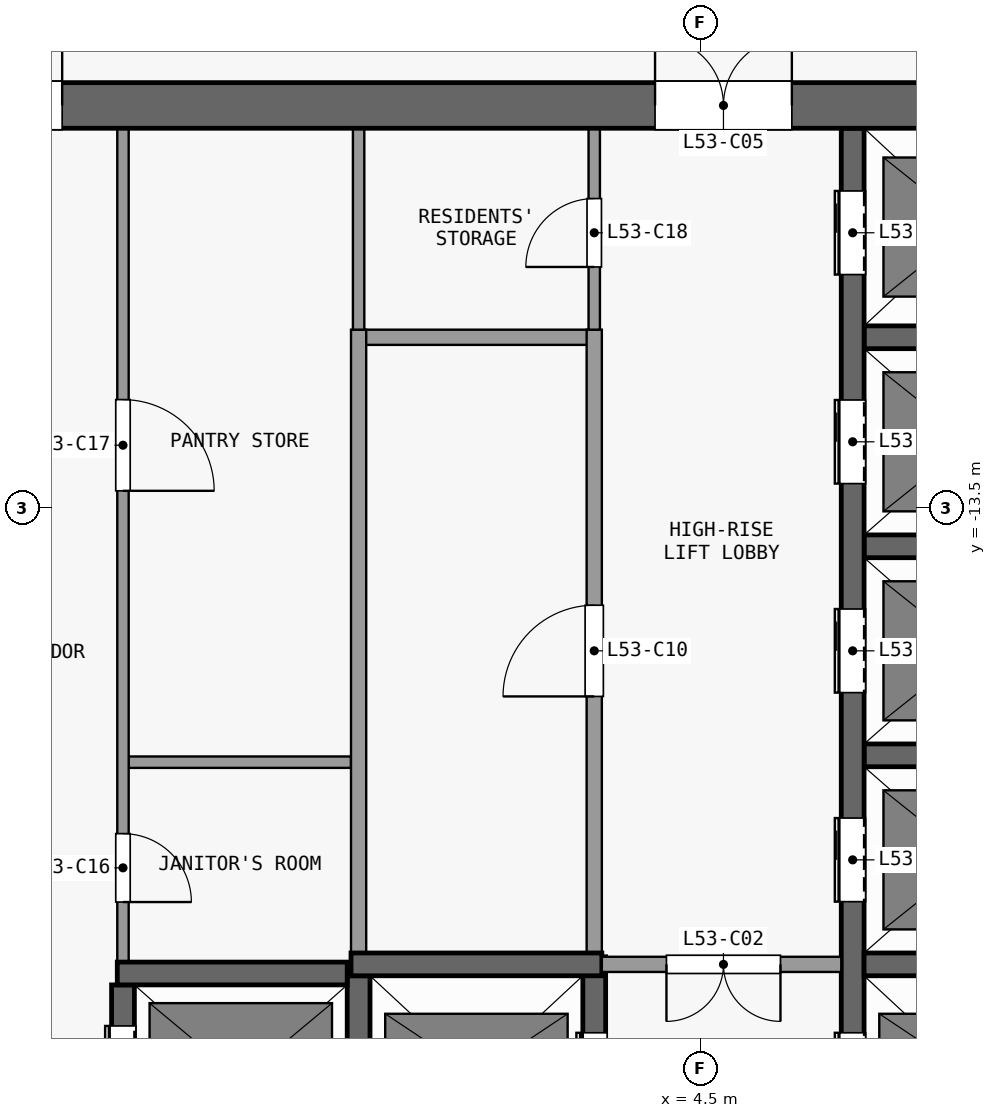
"""IFC4 building model, lengths in metres.
Left out: names, types, materials, properties, quantities, classifications, styles, units other than length and angle.
Written with IfcOpenShell. Run it as: python <this file> out.ifc"""

import sys

from ifc_helpers import new_model, si_unit, direction, frame, frame_2d, origin, place, context, subcontext, project, spatial, rectangle, extrude, element, fill, save


model = new_model("IFC4")
c1 = context("Model", 3, precision=1e-05, world=origin(), true_north=direction((0.0, 1.0)))
c2 = subcontext(c1, "Body", "Model", "MODEL_VIEW")
j1 = project(units=[si_unit("LENGTHUNIT", "METRE"), si_unit("PLANEANGLEUNIT", "RADIAN")], contexts=[c1])
p1 = place(None, origin())
s1 = spatial("IfcSite", under=j1, at=p1, CompositionType="ELEMENT")
p2 = place(p1, origin())
s2 = spatial("IfcBuilding", under=s1, at=p2, CompositionType="ELEMENT")
p3 = place(p2, frame((0.0, 0.0, 212.3)))
s3 = spatial("IfcBuildingStorey", under=s2, at=p3, CompositionType="ELEMENT", Elevation=212.3)
p4 = place(p3, frame((-13.2, -8.2, 0.0), z_axis=(0.0, 0.0, 1.0), x_axis=(1.0, 0.0, 0.0)))
e1 = element("IfcWall", 1, at=p4, inside=s3, PredefinedType="SHEAR", context=c2, shape_type="SweptSolid", body=[
    extrude(rectangle(XDim=26.4, YDim=0.6, at=frame_2d((13.2, 0.0))), origin(), (0.0, 0.0, 1.0), 3.3),
])
p5 = place(p4, frame((7.5, 0.0, 0.0)))
e2 = element("IfcOpeningElement", 2, at=p5, cuts=e1, PredefinedType="OPENING", context=c2, shape_type="SweptSolid", body=[
    extrude(rectangle(XDim=1.8, YDim=2.1, at=frame_2d((0.9, 1.05))), frame((0.0, 0.31, 0.0), z_axis=(0.0, -1.0, 0.0), x_axis=(1.0, 0.0, 0.0)), (0.0, 0.0, 1.0), 0.62),
])
p6 = place(p4, frame((17.1, 0.0, 0.0)))
e3 = element("IfcOpeningElement", 3, at=p6, cuts=e1, PredefinedType="OPENING", context=c2, shape_type="SweptSolid", body=[
    extrude(rectangle(XDim=1.8, YDim=2.1, at=frame_2d((0.9, 1.05))), frame((0.0, 0.31, 0.0), z_axis=(0.0, -1.0, 0.0), x_axis=(1.0, 0.0, 0.0)), (0.0, 0.0, 1.0), 0.62),
])
p7 = place(p4, frame((2.425, 0.0, 0.0)))
e4 = element("IfcOpeningElement", 4, at=p7, cuts=e1, PredefinedType="OPENING", context=c2, shape_type="SweptSolid", body=[
    extrude(rectangle(XDim=0.9, YDim=2.1, at=frame_2d((0.45, 1.05))), frame((0.0, 0.31, 0.0), z_axis=(0.0, -1.0, 0.0), x_axis=(1.0, 0.0, 0.0)), (0.0, 0.0, 1.0), 0.62),
])
p8 = place(p4, frame((23.075, 0.0, 0.0)))
e5 = element("IfcOpeningElement", 5, at=p8, cuts=e1, PredefinedType="OPENING", context=c2, shape_type="SweptSolid", body=[
    extrude(rectangle(XDim=0.9, YDim=2.1, at=frame_2d((0.45, 1.05))), frame((0.0, 0.31, 0.0), z_axis=(0.0, -1.0, 0.0), x_axis=(1.0, 0.0, 0.0)), (0.0, 0.0, 1.0), 0.62),
])
p9 = place(p3, frame((-3.175, -19.62, 0.0), z_axis=(0.0, 0.0, 1.0), x_axis=(1.0, 0.0, 0.0)))
e6 = element("IfcWall", 6, at=p9, inside=s3, PredefinedType="SHEAR", context=c2, shape_type="SweptSolid", body=[
    extrude(rectangle(XDim=3.025, YDim=0.3, at=frame_2d((1.513, 0.0))), origin(), (0.0, 0.0, 1.0), 3.3),
])
p10 = place(p3, frame((-0.1, -19.5, 0.0), z_axis=(0.0, 0.0, 1.0), x_axis=(1.0, 0.0, 0.0)))
e7 = element("IfcWall", 7, at=p10, inside=s3, PredefinedType="SHEAR", context=c2, shape_type="SweptSolid", body=[
    extrude(rectangle(XDim=3.3, YDim=0.3, at=frame_2d((1.65, 0.0))), origin(), (0.0, 0.0, 1.0), 3.3),
])
p11 = place(p3, frame((6.35, -19.5, 0.0), z_axis=(0.0, 0.0, 1.0), x_axis=(-1.0, 0.0, 0.0)))
e8 = element("IfcWall", 8, at=p11, inside=s3, PredefinedType="PARTITIONING", context=c2, shape_type="SweptSolid", body=[
    extrude(rectangle(XDim=3.15, YDim=0.2, at=frame_2d((1.575, 0.0))), origin(), (0.0, 0.0, 1.0), 3.3),
])
p12 = place(p11, frame((0.8, 0.0, 0.0)))
e9 = element("IfcOpeningElement", 9, at=p12, cuts=e8, PredefinedType="OPENING", context=c2, shape_type="SweptSolid", body=[
    extrude(rectangle(XDim=1.5, YDim=2.1, at=frame_2d((0.75, 1.05))), frame((0.0, 0.11, 0.0), z_axis=(0.0, -1.0, 0.0), x_axis=(1.0, 0.0, 0.0)), (0.0, 0.0, 1.0), 0.22),
])
p13 = place(p3, frame((6.65, -19.5, 0.0), z_axis=(0.0, 0.0, 1.0), x_axis=(1.0, 0.0, 0.0)))
e10 = element("IfcWall", 10, at=p13, inside=s3, PredefinedType="SHEAR", context=c2, shape_type="SweptSolid", body=[
    extrude(rectangle(XDim=2.8, YDim=0.3, at=frame_2d((1.4, 0.0))), origin(), (0.0, 0.0, 1.0), 3.3),
])
p14 = place(p3, frame((-3.025, -16.84, 0.0), z_axis=(0.0, 0.0, 1.0), x_axis=(1.0, 0.0, 0.0)))
e11 = element("IfcWall", 11, at=p14, inside=s3, PredefinedType="PARTITIONING", context=c2, shape_type="SweptSolid", body=[
    extrude(rectangle(XDim=2.925, YDim=0.15, at=frame_2d((1.462, 0.0))), origin(), (0.0, 0.0, 1.0), 3.3),
])
for number, where, z_axis, x_axis in (
    (12, (6.65, -16.75, 0.0), (0.0, 0.0, 1.0), (1.0, 0.0, 0.0)),
    (13, (6.65, -14.0, 0.0), (0.0, 0.0, 1.0), (1.0, 0.0, 0.0)),
):
    element("IfcWall", number, at=place(p3, frame(where, z_axis=z_axis, x_axis=x_axis)), inside=s3, PredefinedType="SHEAR", context=c2, shape_type="SweptSolid", body=[
        extrude(rectangle(XDim=2.8, YDim=0.3, at=frame_2d((1.4, 0.0))), origin(), (0.0, 0.0, 1.0), 3.3),
    ])
p15 = place(p3, frame((-0.075, -11.25, 0.0), z_axis=(0.0, 0.0, 1.0), x_axis=(1.0, 0.0, 0.0)))
e14 = element("IfcWall", 14, at=p15, inside=s3, PredefinedType="PARTITIONING", context=c2, shape_type="SweptSolid", body=[
    extrude(rectangle(XDim=3.25, YDim=0.2, at=frame_2d((1.625, 0.0))), origin(), (0.0, 0.0, 1.0), 3.3),
])
p16 = place(p3, frame((6.65, -11.25, 0.0), z_axis=(0.0, 0.0, 1.0), x_axis=(1.0, 0.0, 0.0)))
e15 = element("IfcWall", 15, at=p16, inside=s3, PredefinedType="SHEAR", context=c2, shape_type="SweptSolid", body=[
    extrude(rectangle(XDim=2.8, YDim=0.3, at=frame_2d((1.4, 0.0))), origin(), (0.0, 0.0, 1.0), 3.3),
])
p17 = place(p3, frame((-3.1, -22.25, 0.0), z_axis=(0.0, 0.0, 1.0), x_axis=(0.0, 1.0, 0.0)))
e16 = element("IfcWall", 16, at=p17, inside=s3, PredefinedType="SHEAR", context=c2, shape_type="SweptSolid", body=[
    extrude(rectangle(XDim=2.48, YDim=0.3, at=frame_2d((1.24, 0.0))), origin(), (0.0, 0.0, 1.0), 3.3),
])
p18 = place(p17, frame((0.54, 0.0, 0.0)))
e17 = element("IfcOpeningElement", 17, at=p18, cuts=e16, PredefinedType="OPENING", context=c2, shape_type="SweptSolid", body=[
    extrude(rectangle(XDim=1.4, YDim=2.1, at=frame_2d((0.7, 1.05))), frame((0.0, 0.16, 0.0), z_axis=(0.0, -1.0, 0.0), x_axis=(1.0, 0.0, 0.0)), (0.0, 0.0, 1.0), 0.32),
])
p19 = place(p3, frame((-3.1, -8.5, 0.0), z_axis=(0.0, 0.0, 1.0), x_axis=(0.0, -1.0, 0.0)))
e18 = element("IfcWall", 18, at=p19, inside=s3, PredefinedType="PARTITIONING", context=c2, shape_type="SweptSolid", body=[
    extrude(rectangle(XDim=10.97, YDim=0.15, at=frame_2d((5.485, 0.0))), origin(), (0.0, 0.0, 1.0), 3.3),
])
p20 = place(p19, frame((9.28, 0.0, 0.0)))
e19 = element("IfcOpeningElement", 19, at=p20, cuts=e18, PredefinedType="OPENING", context=c2, shape_type="SweptSolid", body=[
    extrude(rectangle(XDim=0.9, YDim=2.1, at=frame_2d((0.45, 1.05))), frame((0.0, 0.085, 0.0), z_axis=(0.0, -1.0, 0.0), x_axis=(1.0, 0.0, 0.0)), (0.0, 0.0, 1.0), 0.17),
])
p21 = place(p19, frame((3.57, 0.0, 0.0)))
e20 = element("IfcOpeningElement", 20, at=p21, cuts=e18, PredefinedType="OPENING", context=c2, shape_type="SweptSolid", body=[
    extrude(rectangle(XDim=1.2, YDim=2.1, at=frame_2d((0.6, 1.05))), frame((0.0, 0.085, 0.0), z_axis=(0.0, -1.0, 0.0), x_axis=(1.0, 0.0, 0.0)), (0.0, 0.0, 1.0), 0.17),
])
p22 = place(p3, frame((0.0, -22.25, 0.0), z_axis=(0.0, 0.0, 1.0), x_axis=(0.0, 1.0, 0.0)))
e21 = element("IfcWall", 21, at=p22, inside=s3, PredefinedType="SHEAR", context=c2, shape_type="SweptSolid", body=[
    extrude(rectangle(XDim=2.6, YDim=0.3, at=frame_2d((1.3, 0.0))), origin(), (0.0, 0.0, 1.0), 3.3),
])
p23 = place(p3, frame((0.0, -19.35, 0.0), z_axis=(0.0, 0.0, 1.0), x_axis=(0.0, 1.0, 0.0)))
e22 = element("IfcWall", 22, at=p23, inside=s3, PredefinedType="PARTITIONING", context=c2, shape_type="SweptSolid", body=[
    extrude(rectangle(XDim=8.2, YDim=0.2, at=frame_2d((4.1, 0.0))), origin(), (0.0, 0.0, 1.0), 3.3),
])
p24 = place(p3, frame((0.0, -11.15, 0.0), z_axis=(0.0, 0.0, 1.0), x_axis=(0.0, 1.0, 0.0)))
e23 = element("IfcWall", 23, at=p24, inside=s3, PredefinedType="PARTITIONING", context=c2, shape_type="SweptSolid", body=[
    extrude(rectangle(XDim=2.65, YDim=0.15, at=frame_2d((1.325, 0.0))), origin(), (0.0, 0.0, 1.0), 3.3),
])
p25 = place(p3, frame((3.1, -22.25, 0.0), z_axis=(0.0, 0.0, 1.0), x_axis=(0.0, 1.0, 0.0)))
e24 = element("IfcWall", 24, at=p25, inside=s3, PredefinedType="SHEAR", context=c2, shape_type="SweptSolid", body=[
    extrude(rectangle(XDim=2.85, YDim=0.3, at=frame_2d((1.425, 0.0))), origin(), (0.0, 0.0, 1.0), 3.3),
])
p26 = place(p25, frame((0.75, 0.0, 0.0)))
e25 = element("IfcOpeningElement", 25, at=p26, cuts=e24, PredefinedType="OPENING", context=c2, shape_type="SweptSolid", body=[
    extrude(rectangle(XDim=1.1, YDim=2.1, at=frame_2d((0.55, 1.05))), frame((0.0, 0.16, 0.0), z_axis=(0.0, -1.0, 0.0), x_axis=(1.0, 0.0, 0.0)), (0.0, 0.0, 1.0), 0.32),
])
p27 = place(p3, frame((3.1, -19.6, 0.0), z_axis=(0.0, 0.0, 1.0), x_axis=(0.0, 1.0, 0.0)))
e26 = element("IfcWall", 26, at=p27, inside=s3, PredefinedType="PARTITIONING", context=c2, shape_type="SweptSolid", body=[
    extrude(rectangle(XDim=8.45, YDim=0.2, at=frame_2d((4.225, 0.0))), origin(), (0.0, 0.0, 1.0), 3.3),
])
p28 = place(p27, frame((3.625, 0.0, 0.0)))
e27 = element("IfcOpeningElement", 27, at=p28, cuts=e26, PredefinedType="OPENING", context=c2, shape_type="SweptSolid", body=[
    extrude(rectangle(XDim=1.2, YDim=2.1, at=frame_2d((0.6, 1.05))), frame((0.0, 0.11, 0.0), z_axis=(0.0, -1.0, 0.0), x_axis=(1.0, 0.0, 0.0)), (0.0, 0.0, 1.0), 0.22),
])
p29 = place(p3, frame((3.1, -11.15, 0.0), z_axis=(0.0, 0.0, 1.0), x_axis=(0.0, 1.0, 0.0)))
e28 = element("IfcWall", 28, at=p29, inside=s3, PredefinedType="PARTITIONING", context=c2, shape_type="SweptSolid", body=[
    extrude(rectangle(XDim=2.65, YDim=0.15, at=frame_2d((1.325, 0.0))), origin(), (0.0, 0.0, 1.0), 3.3),
])
p30 = place(p29, frame((0.825, 0.0, 0.0)))
e29 = element("IfcOpeningElement", 29, at=p30, cuts=e28, PredefinedType="OPENING", context=c2, shape_type="SweptSolid", body=[
    extrude(rectangle(XDim=0.9, YDim=2.1, at=frame_2d((0.45, 1.05))), frame((0.0, 0.085, 0.0), z_axis=(0.0, -1.0, 0.0), x_axis=(1.0, 0.0, 0.0)), (0.0, 0.0, 1.0), 0.17),
])
p31 = place(p3, frame((6.5, -22.55, 0.0), z_axis=(0.0, 0.0, 1.0), x_axis=(0.0, 1.0, 0.0)))
e30 = element("IfcWall", 30, at=p31, inside=s3, PredefinedType="SHEAR", context=c2, shape_type="SweptSolid", body=[
    extrude(rectangle(XDim=14.05, YDim=0.3, at=frame_2d((7.025, 0.0))), origin(), (0.0, 0.0, 1.0), 3.3),
])
p32 = place(p31, frame((1.05, 0.0, 0.0)))
e31 = element("IfcOpeningElement", 31, at=p32, cuts=e30, PredefinedType="OPENING", context=c2, shape_type="SweptSolid", body=[
    extrude(rectangle(XDim=1.1, YDim=2.1, at=frame_2d((0.55, 1.05))), frame((0.0, 0.16, 0.0), z_axis=(0.0, -1.0, 0.0), x_axis=(1.0, 0.0, 0.0)), (0.0, 0.0, 1.0), 0.32),
])
p33 = place(p31, frame((3.875, 0.0, 0.0)))
e32 = element("IfcOpeningElement", 32, at=p33, cuts=e30, PredefinedType="OPENING", context=c2, shape_type="SweptSolid", body=[
    extrude(rectangle(XDim=1.1, YDim=2.1, at=frame_2d((0.55, 1.05))), frame((0.0, 0.16, 0.0), z_axis=(0.0, -1.0, 0.0), x_axis=(1.0, 0.0, 0.0)), (0.0, 0.0, 1.0), 0.32),
])
p34 = place(p31, frame((6.625, 0.0, 0.0)))
e33 = element("IfcOpeningElement", 33, at=p34, cuts=e30, PredefinedType="OPENING", context=c2, shape_type="SweptSolid", body=[
    extrude(rectangle(XDim=1.1, YDim=2.1, at=frame_2d((0.55, 1.05))), frame((0.0, 0.16, 0.0), z_axis=(0.0, -1.0, 0.0), x_axis=(1.0, 0.0, 0.0)), (0.0, 0.0, 1.0), 0.32),
])
p35 = place(p31, frame((9.375, 0.0, 0.0)))
e34 = element("IfcOpeningElement", 34, at=p35, cuts=e30, PredefinedType="OPENING", context=c2, shape_type="SweptSolid", body=[
    extrude(rectangle(XDim=1.1, YDim=2.1, at=frame_2d((0.55, 1.05))), frame((0.0, 0.16, 0.0), z_axis=(0.0, -1.0, 0.0), x_axis=(1.0, 0.0, 0.0)), (0.0, 0.0, 1.0), 0.32),
])
p36 = place(p31, frame((12.125, 0.0, 0.0)))
e35 = element("IfcOpeningElement", 35, at=p36, cuts=e30, PredefinedType="OPENING", context=c2, shape_type="SweptSolid", body=[
    extrude(rectangle(XDim=1.1, YDim=2.1, at=frame_2d((0.55, 1.05))), frame((0.0, 0.16, 0.0), z_axis=(0.0, -1.0, 0.0), x_axis=(1.0, 0.0, 0.0)), (0.0, 0.0, 1.0), 0.32),
])
p37 = place(p26, origin())
e36 = element("IfcDoor", 36, at=p37, inside=s3, OperationType="DOUBLE_DOOR_SLIDING", PredefinedType="DOOR", context=c2, shape_type="SweptSolid", body=[
    extrude(rectangle(XDim=1.1, YDim=2.1, at=frame_2d((0.55, 1.05))), frame((0.0, 0.025, 0.0), z_axis=(0.0, -1.0, 0.0), x_axis=(1.0, 0.0, 0.0)), (0.0, 0.0, 1.0), 0.05),
])
fill(e25, e36)
p38 = place(p32, origin())
e37 = element("IfcDoor", 37, at=p38, inside=s3, OperationType="DOUBLE_DOOR_SLIDING", PredefinedType="DOOR", context=c2, shape_type="SweptSolid", body=[
    extrude(rectangle(XDim=1.1, YDim=2.1, at=frame_2d((0.55, 1.05))), frame((0.0, 0.025, 0.0), z_axis=(0.0, -1.0, 0.0), x_axis=(1.0, 0.0, 0.0)), (0.0, 0.0, 1.0), 0.05),
])
fill(e31, e37)
p39 = place(p33, origin())
e38 = element("IfcDoor", 38, at=p39, inside=s3, OperationType="DOUBLE_DOOR_SLIDING", PredefinedType="DOOR", context=c2, shape_type="SweptSolid", body=[
    extrude(rectangle(XDim=1.1, YDim=2.1, at=frame_2d((0.55, 1.05))), frame((0.0, 0.025, 0.0), z_axis=(0.0, -1.0, 0.0), x_axis=(1.0, 0.0, 0.0)), (0.0, 0.0, 1.0), 0.05),
])
fill(e32, e38)
p40 = place(p34, origin())
e39 = element("IfcDoor", 39, at=p40, inside=s3, OperationType="DOUBLE_DOOR_SLIDING", PredefinedType="DOOR", context=c2, shape_type="SweptSolid", body=[
    extrude(rectangle(XDim=1.1, YDim=2.1, at=frame_2d((0.55, 1.05))), frame((0.0, 0.025, 0.0), z_axis=(0.0, -1.0, 0.0), x_axis=(1.0, 0.0, 0.0)), (0.0, 0.0, 1.0), 0.05),
])
fill(e33, e39)
p41 = place(p35, origin())
e40 = element("IfcDoor", 40, at=p41, inside=s3, OperationType="DOUBLE_DOOR_SLIDING", PredefinedType="DOOR", context=c2, shape_type="SweptSolid", body=[
    extrude(rectangle(XDim=1.1, YDim=2.1, at=frame_2d((0.55, 1.05))), frame((0.0, 0.025, 0.0), z_axis=(0.0, -1.0, 0.0), x_axis=(1.0, 0.0, 0.0)), (0.0, 0.0, 1.0), 0.05),
])
fill(e34, e40)
p42 = place(p36, origin())
e41 = element("IfcDoor", 41, at=p42, inside=s3, OperationType="DOUBLE_DOOR_SLIDING", PredefinedType="DOOR", context=c2, shape_type="SweptSolid", body=[
    extrude(rectangle(XDim=1.1, YDim=2.1, at=frame_2d((0.55, 1.05))), frame((0.0, 0.025, 0.0), z_axis=(0.0, -1.0, 0.0), x_axis=(1.0, 0.0, 0.0)), (0.0, 0.0, 1.0), 0.05),
])
fill(e35, e41)
p43 = place(p18, origin())
e42 = element("IfcDoor", 42, at=p43, inside=s3, OperationType="DOUBLE_DOOR_SLIDING", PredefinedType="DOOR", context=c2, shape_type="SweptSolid", body=[
    extrude(rectangle(XDim=1.4, YDim=2.1, at=frame_2d((0.7, 1.05))), frame((0.0, 0.025, 0.0), z_axis=(0.0, -1.0, 0.0), x_axis=(1.0, 0.0, 0.0)), (0.0, 0.0, 1.0), 0.05),
])
fill(e17, e42)
p44 = place(p12, origin())
e43 = element("IfcDoor", 43, at=p44, inside=s3, OperationType="DOUBLE_DOOR_SINGLE_SWING", PredefinedType="DOOR", context=c2, shape_type="SweptSolid", body=[
    extrude(rectangle(XDim=1.5, YDim=2.1, at=frame_2d((0.75, 1.05))), frame((0.0, 0.025, 0.0), z_axis=(0.0, -1.0, 0.0), x_axis=(1.0, 0.0, 0.0)), (0.0, 0.0, 1.0), 0.05),
])
fill(e9, e43)
p45 = place(p5, origin())
e44 = element("IfcDoor", 44, at=p45, inside=s3, OperationType="DOUBLE_DOOR_SINGLE_SWING", PredefinedType="DOOR", context=c2, shape_type="SweptSolid", body=[
    extrude(rectangle(XDim=1.8, YDim=2.1, at=frame_2d((0.9, 1.05))), frame((0.0, 0.025, 0.0), z_axis=(0.0, -1.0, 0.0), x_axis=(1.0, 0.0, 0.0)), (0.0, 0.0, 1.0), 0.05),
])
fill(e2, e44)
p46 = place(p6, origin())
e45 = element("IfcDoor", 45, at=p46, inside=s3, OperationType="DOUBLE_DOOR_SINGLE_SWING", PredefinedType="DOOR", context=c2, shape_type="SweptSolid", body=[
    extrude(rectangle(XDim=1.8, YDim=2.1, at=frame_2d((0.9, 1.05))), frame((0.0, 0.025, 0.0), z_axis=(0.0, -1.0, 0.0), x_axis=(1.0, 0.0, 0.0)), (0.0, 0.0, 1.0), 0.05),
])
fill(e3, e45)
p47 = place(p28, origin())
e46 = element("IfcDoor", 46, at=p47, inside=s3, OperationType="SINGLE_SWING_LEFT", PredefinedType="DOOR", context=c2, shape_type="SweptSolid", body=[
    extrude(rectangle(XDim=1.2, YDim=2.1, at=frame_2d((0.6, 1.05))), frame((0.0, 0.025, 0.0), z_axis=(0.0, -1.0, 0.0), x_axis=(1.0, 0.0, 0.0)), (0.0, 0.0, 1.0), 0.05),
])
fill(e27, e46)
p48 = place(p20, origin())
e47 = element("IfcDoor", 47, at=p48, inside=s3, OperationType="SINGLE_SWING_RIGHT", PredefinedType="DOOR", context=c2, shape_type="SweptSolid", body=[
    extrude(rectangle(XDim=0.9, YDim=2.1, at=frame_2d((0.45, 1.05))), frame((0.0, 0.025, 0.0), z_axis=(0.0, -1.0, 0.0), x_axis=(1.0, 0.0, 0.0)), (0.0, 0.0, 1.0), 0.05),
])
fill(e19, e47)
p49 = place(p21, origin())
e48 = element("IfcDoor", 48, at=p49, inside=s3, OperationType="SINGLE_SWING_RIGHT", PredefinedType="DOOR", context=c2, shape_type="SweptSolid", body=[
    extrude(rectangle(XDim=1.2, YDim=2.1, at=frame_2d((0.6, 1.05))), frame((0.0, 0.025, 0.0), z_axis=(0.0, -1.0, 0.0), x_axis=(1.0, 0.0, 0.0)), (0.0, 0.0, 1.0), 0.05),
])
fill(e20, e48)
p50 = place(p30, origin())
e49 = element("IfcDoor", 49, at=p50, inside=s3, OperationType="SINGLE_SWING_LEFT", PredefinedType="DOOR", context=c2, shape_type="SweptSolid", body=[
    extrude(rectangle(XDim=0.9, YDim=2.1, at=frame_2d((0.45, 1.05))), frame((0.0, 0.025, 0.0), z_axis=(0.0, -1.0, 0.0), x_axis=(1.0, 0.0, 0.0)), (0.0, 0.0, 1.0), 0.05),
])
fill(e29, e49)
save(model, sys.argv[1])
